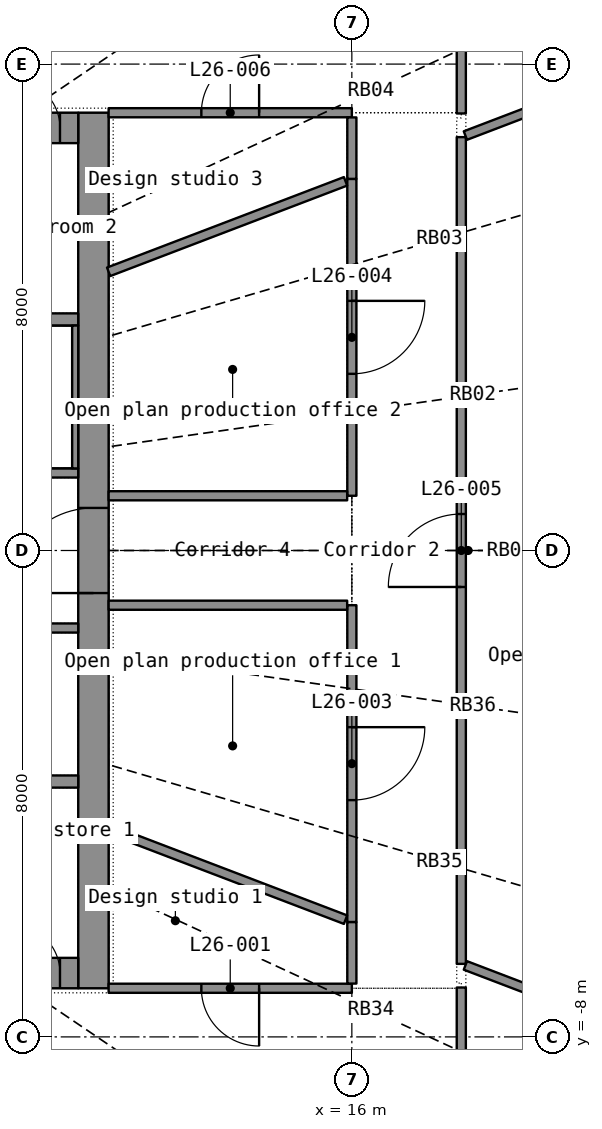
"""IFC4 building model, lengths in metres.
Left out: names, types, materials, properties, quantities, classifications, styles, units other than length and angle.
Written with IfcOpenShell. Run it as: python <this file> out.ifc"""

import sys

from ifc_helpers import new_model, si_unit, direction, frame, frame_2d, origin, place, context, subcontext, project, spatial, rectangle, extrude, element, fill, save


model = new_model("IFC4")
c1 = context("Model", 3, precision=1e-05, world=origin(), true_north=direction((0.0, 1.0)))
c2 = subcontext(c1, "Body", "Model", "MODEL_VIEW")
j1 = project(units=[si_unit("LENGTHUNIT", "METRE"), si_unit("PLANEANGLEUNIT", "RADIAN")], contexts=[c1])
p1 = place(None, origin())
s1 = spatial("IfcSite", under=j1, at=p1, CompositionType="ELEMENT")
p2 = place(p1, origin())
s2 = spatial("IfcBuilding", under=s1, at=p2, CompositionType="ELEMENT")
p3 = place(p2, frame((0.0, 0.0, 111.9)))
s3 = spatial("IfcBuildingStorey", under=s2, at=p3, CompositionType="ELEMENT", Elevation=111.9)
p4 = place(p3, frame((11.75, -7.2, 0.0), z_axis=(0.0, 0.0, 1.0), x_axis=(0.0, 1.0, 0.0)))
e1 = element("IfcWall", 1, at=p4, inside=s3, PredefinedType="SHEAR", context=c2, shape_type="SweptSolid", body=[
    extrude(rectangle(XDim=14.4, YDim=0.5, at=frame_2d((7.2, 0.0))), origin(), (0.0, 0.0, 1.0), 3.3),
])
p5 = place(p4, frame((6.5, 0.0, 0.0)))
e2 = element("IfcOpeningElement", 2, at=p5, cuts=e1, PredefinedType="OPENING", context=c2, shape_type="SweptSolid", body=[
    extrude(rectangle(XDim=1.4, YDim=2.2, at=frame_2d((0.7, 1.1))), frame((0.0, 0.26, 0.0), z_axis=(0.0, -1.0, 0.0), x_axis=(1.0, 0.0, 0.0)), (0.0, 0.0, 1.0), 0.52),
])
p6 = place(p3, frame((-11.5, -6.95, 0.0), z_axis=(0.0, 0.0, 1.0), x_axis=(1.0, 0.0, 0.0)))
e3 = element("IfcWall", 3, at=p6, inside=s3, PredefinedType="SHEAR", context=c2, shape_type="SweptSolid", body=[
    extrude(rectangle(XDim=23.0, YDim=0.5, at=frame_2d((11.5, 0.0))), origin(), (0.0, 0.0, 1.0), 3.3),
])
p7 = place(p6, frame((1.95, 0.0, 0.0)))
e4 = element("IfcOpeningElement", 4, at=p7, cuts=e3, PredefinedType="OPENING", context=c2, shape_type="SweptSolid", body=[
    extrude(rectangle(XDim=1.1, YDim=2.2, at=frame_2d((0.55, 1.1))), frame((0.0, 0.26, 0.0), z_axis=(0.0, -1.0, 0.0), x_axis=(1.0, 0.0, 0.0)), (0.0, 0.0, 1.0), 0.52),
])
p8 = place(p6, frame((3.95, 0.0, 0.0)))
e5 = element("IfcOpeningElement", 5, at=p8, cuts=e3, PredefinedType="OPENING", context=c2, shape_type="SweptSolid", body=[
    extrude(rectangle(XDim=1.1, YDim=2.2, at=frame_2d((0.55, 1.1))), frame((0.0, 0.26, 0.0), z_axis=(0.0, -1.0, 0.0), x_axis=(1.0, 0.0, 0.0)), (0.0, 0.0, 1.0), 0.52),
])
p9 = place(p6, frame((5.95, 0.0, 0.0)))
e6 = element("IfcOpeningElement", 6, at=p9, cuts=e3, PredefinedType="OPENING", context=c2, shape_type="SweptSolid", body=[
    extrude(rectangle(XDim=1.1, YDim=2.2, at=frame_2d((0.55, 1.1))), frame((0.0, 0.26, 0.0), z_axis=(0.0, -1.0, 0.0), x_axis=(1.0, 0.0, 0.0)), (0.0, 0.0, 1.0), 0.52),
])
p10 = place(p6, frame((7.95, 0.0, 0.0)))
e7 = element("IfcOpeningElement", 7, at=p10, cuts=e3, PredefinedType="OPENING", context=c2, shape_type="SweptSolid", body=[
    extrude(rectangle(XDim=1.1, YDim=2.2, at=frame_2d((0.55, 1.1))), frame((0.0, 0.26, 0.0), z_axis=(0.0, -1.0, 0.0), x_axis=(1.0, 0.0, 0.0)), (0.0, 0.0, 1.0), 0.52),
])
p11 = place(p6, frame((9.95, 0.0, 0.0)))
e8 = element("IfcOpeningElement", 8, at=p11, cuts=e3, PredefinedType="OPENING", context=c2, shape_type="SweptSolid", body=[
    extrude(rectangle(XDim=1.1, YDim=2.2, at=frame_2d((0.55, 1.1))), frame((0.0, 0.26, 0.0), z_axis=(0.0, -1.0, 0.0), x_axis=(1.0, 0.0, 0.0)), (0.0, 0.0, 1.0), 0.52),
])
p12 = place(p6, frame((11.95, 0.0, 0.0)))
e9 = element("IfcOpeningElement", 9, at=p12, cuts=e3, PredefinedType="OPENING", context=c2, shape_type="SweptSolid", body=[
    extrude(rectangle(XDim=1.1, YDim=2.2, at=frame_2d((0.55, 1.1))), frame((0.0, 0.26, 0.0), z_axis=(0.0, -1.0, 0.0), x_axis=(1.0, 0.0, 0.0)), (0.0, 0.0, 1.0), 0.52),
])
p13 = place(p6, frame((13.95, 0.0, 0.0)))
e10 = element("IfcOpeningElement", 10, at=p13, cuts=e3, PredefinedType="OPENING", context=c2, shape_type="SweptSolid", body=[
    extrude(rectangle(XDim=1.1, YDim=2.2, at=frame_2d((0.55, 1.1))), frame((0.0, 0.26, 0.0), z_axis=(0.0, -1.0, 0.0), x_axis=(1.0, 0.0, 0.0)), (0.0, 0.0, 1.0), 0.52),
])
p14 = place(p6, frame((15.95, 0.0, 0.0)))
e11 = element("IfcOpeningElement", 11, at=p14, cuts=e3, PredefinedType="OPENING", context=c2, shape_type="SweptSolid", body=[
    extrude(rectangle(XDim=1.1, YDim=2.2, at=frame_2d((0.55, 1.1))), frame((0.0, 0.26, 0.0), z_axis=(0.0, -1.0, 0.0), x_axis=(1.0, 0.0, 0.0)), (0.0, 0.0, 1.0), 0.52),
])
p15 = place(p6, frame((19.95, 0.0, 0.0)))
e12 = element("IfcOpeningElement", 12, at=p15, cuts=e3, PredefinedType="OPENING", context=c2, shape_type="SweptSolid", body=[
    extrude(rectangle(XDim=1.1, YDim=2.2, at=frame_2d((0.55, 1.1))), frame((0.0, 0.26, 0.0), z_axis=(0.0, -1.0, 0.0), x_axis=(1.0, 0.0, 0.0)), (0.0, 0.0, 1.0), 0.52),
])
p16 = place(p6, frame((0.3, 0.0, 0.0)))
e13 = element("IfcOpeningElement", 13, at=p16, cuts=e3, PredefinedType="OPENING", context=c2, shape_type="SweptSolid", body=[
    extrude(rectangle(XDim=0.8, YDim=2.05, at=frame_2d((0.4, 1.025))), frame((0.0, 0.26, 0.0), z_axis=(0.0, -1.0, 0.0), x_axis=(1.0, 0.0, 0.0)), (0.0, 0.0, 1.0), 0.52),
])
p17 = place(p6, frame((21.9, 0.0, 0.0)))
e14 = element("IfcOpeningElement", 14, at=p17, cuts=e3, PredefinedType="OPENING", context=c2, shape_type="SweptSolid", body=[
    extrude(rectangle(XDim=0.8, YDim=2.05, at=frame_2d((0.4, 1.025))), frame((0.0, 0.26, 0.0), z_axis=(0.0, -1.0, 0.0), x_axis=(1.0, 0.0, 0.0)), (0.0, 0.0, 1.0), 0.52),
])
p18 = place(p3, frame((-11.5, 6.95, 0.0), z_axis=(0.0, 0.0, 1.0), x_axis=(1.0, 0.0, 0.0)))
e15 = element("IfcWall", 15, at=p18, inside=s3, PredefinedType="SHEAR", context=c2, shape_type="SweptSolid", body=[
    extrude(rectangle(XDim=23.0, YDim=0.5, at=frame_2d((11.5, 0.0))), origin(), (0.0, 0.0, 1.0), 3.3),
])
p19 = place(p18, frame((1.95, 0.0, 0.0)))
e16 = element("IfcOpeningElement", 16, at=p19, cuts=e15, PredefinedType="OPENING", context=c2, shape_type="SweptSolid", body=[
    extrude(rectangle(XDim=1.1, YDim=2.2, at=frame_2d((0.55, 1.1))), frame((0.0, 0.26, 0.0), z_axis=(0.0, -1.0, 0.0), x_axis=(1.0, 0.0, 0.0)), (0.0, 0.0, 1.0), 0.52),
])
p20 = place(p18, frame((8.05, 0.0, 0.0)))
e17 = element("IfcOpeningElement", 17, at=p20, cuts=e15, PredefinedType="OPENING", context=c2, shape_type="SweptSolid", body=[
    extrude(rectangle(XDim=0.9, YDim=2.1, at=frame_2d((0.45, 1.05))), frame((0.0, 0.26, 0.0), z_axis=(0.0, -1.0, 0.0), x_axis=(1.0, 0.0, 0.0)), (0.0, 0.0, 1.0), 0.52),
])
p21 = place(p18, frame((13.05, 0.0, 0.0)))
e18 = element("IfcOpeningElement", 18, at=p21, cuts=e15, PredefinedType="OPENING", context=c2, shape_type="SweptSolid", body=[
    extrude(rectangle(XDim=0.9, YDim=2.1, at=frame_2d((0.45, 1.05))), frame((0.0, 0.26, 0.0), z_axis=(0.0, -1.0, 0.0), x_axis=(1.0, 0.0, 0.0)), (0.0, 0.0, 1.0), 0.52),
])
p22 = place(p18, frame((18.05, 0.0, 0.0)))
e19 = element("IfcOpeningElement", 19, at=p22, cuts=e15, PredefinedType="OPENING", context=c2, shape_type="SweptSolid", body=[
    extrude(rectangle(XDim=0.9, YDim=2.1, at=frame_2d((0.45, 1.05))), frame((0.0, 0.26, 0.0), z_axis=(0.0, -1.0, 0.0), x_axis=(1.0, 0.0, 0.0)), (0.0, 0.0, 1.0), 0.52),
])
p23 = place(p18, frame((0.3, 0.0, 0.0)))
e20 = element("IfcOpeningElement", 20, at=p23, cuts=e15, PredefinedType="OPENING", context=c2, shape_type="SweptSolid", body=[
    extrude(rectangle(XDim=0.8, YDim=2.05, at=frame_2d((0.4, 1.025))), frame((0.0, 0.26, 0.0), z_axis=(0.0, -1.0, 0.0), x_axis=(1.0, 0.0, 0.0)), (0.0, 0.0, 1.0), 0.52),
])
p24 = place(p18, frame((21.9, 0.0, 0.0)))
e21 = element("IfcOpeningElement", 21, at=p24, cuts=e15, PredefinedType="OPENING", context=c2, shape_type="SweptSolid", body=[
    extrude(rectangle(XDim=0.8, YDim=2.05, at=frame_2d((0.4, 1.025))), frame((0.0, 0.26, 0.0), z_axis=(0.0, -1.0, 0.0), x_axis=(1.0, 0.0, 0.0)), (0.0, 0.0, 1.0), 0.52),
])
for number, where, z_axis, x_axis in (
    (22, (-11.5, -3.8, 0.0), (0.0, 0.0, 1.0), (1.0, 0.0, 0.0)),
    (23, (-11.5, 3.8, 0.0), (0.0, 0.0, 1.0), (1.0, 0.0, 0.0)),
):
    element("IfcWall", number, at=place(p3, frame(where, z_axis=z_axis, x_axis=x_axis)), inside=s3, PredefinedType="SHEAR", context=c2, shape_type="SweptSolid", body=[
        extrude(rectangle(XDim=23.0, YDim=0.2, at=frame_2d((11.5, 0.0))), origin(), (0.0, 0.0, 1.0), 3.3),
    ])
p25 = place(p3, frame((3.0, -1.275, 0.0), z_axis=(0.0, 0.0, 1.0), x_axis=(1.0, 0.0, 0.0)))
e24 = element("IfcWall", 24, at=p25, inside=s3, PredefinedType="PARTITIONING", context=c2, shape_type="SweptSolid", body=[
    extrude(rectangle(XDim=8.5, YDim=0.15, at=frame_2d((4.25, 0.0))), origin(), (0.0, 0.0, 1.0), 3.3),
])
p26 = place(p25, frame((0.969, 0.0, 0.0)))
e25 = element("IfcOpeningElement", 25, at=p26, cuts=e24, PredefinedType="OPENING", context=c2, shape_type="SweptSolid", body=[
    extrude(rectangle(XDim=0.85, YDim=2.1, at=frame_2d((0.425, 1.05))), frame((0.0, 0.085, 0.0), z_axis=(0.0, -1.0, 0.0), x_axis=(1.0, 0.0, 0.0)), (0.0, 0.0, 1.0), 0.17),
])
p27 = place(p25, frame((3.661, 0.0, 0.0)))
e26 = element("IfcOpeningElement", 26, at=p27, cuts=e24, PredefinedType="OPENING", context=c2, shape_type="SweptSolid", body=[
    extrude(rectangle(XDim=0.85, YDim=2.1, at=frame_2d((0.425, 1.05))), frame((0.0, 0.085, 0.0), z_axis=(0.0, -1.0, 0.0), x_axis=(1.0, 0.0, 0.0)), (0.0, 0.0, 1.0), 0.17),
])
p28 = place(p25, frame((6.492, 0.0, 0.0)))
e27 = element("IfcOpeningElement", 27, at=p28, cuts=e24, PredefinedType="OPENING", context=c2, shape_type="SweptSolid", body=[
    extrude(rectangle(XDim=0.9, YDim=2.1, at=frame_2d((0.45, 1.05))), frame((0.0, 0.085, 0.0), z_axis=(0.0, -1.0, 0.0), x_axis=(1.0, 0.0, 0.0)), (0.0, 0.0, 1.0), 0.17),
])
p29 = place(p3, frame((3.0, 1.275, 0.0), z_axis=(0.0, 0.0, 1.0), x_axis=(1.0, 0.0, 0.0)))
e28 = element("IfcWall", 28, at=p29, inside=s3, PredefinedType="SHEAR", context=c2, shape_type="SweptSolid", body=[
    extrude(rectangle(XDim=8.5, YDim=0.15, at=frame_2d((4.25, 0.0))), origin(), (0.0, 0.0, 1.0), 3.3),
])
p30 = place(p29, frame((2.05, 0.0, 0.0)))
e29 = element("IfcOpeningElement", 29, at=p30, cuts=e28, PredefinedType="OPENING", context=c2, shape_type="SweptSolid", body=[
    extrude(rectangle(XDim=1.1, YDim=2.15, at=frame_2d((0.55, 1.075))), frame((0.0, 0.085, 0.0), z_axis=(0.0, -1.0, 0.0), x_axis=(1.0, 0.0, 0.0)), (0.0, 0.0, 1.0), 0.17),
])
p31 = place(p29, frame((0.45, 0.0, 0.0)))
e30 = element("IfcOpeningElement", 30, at=p31, cuts=e28, PredefinedType="OPENING", context=c2, shape_type="SweptSolid", body=[
    extrude(rectangle(XDim=0.9, YDim=2.1, at=frame_2d((0.45, 1.05))), frame((0.0, 0.085, 0.0), z_axis=(0.0, -1.0, 0.0), x_axis=(1.0, 0.0, 0.0)), (0.0, 0.0, 1.0), 0.17),
])
p32 = place(p3, frame((11.45, 1.35, 0.0), z_axis=(0.0, 0.0, 1.0), x_axis=(0.0, 1.0, 0.0)))
e31 = element("IfcWall", 31, at=p32, inside=s3, PredefinedType="SHEAR", context=c2, shape_type="SweptSolid", body=[
    extrude(rectangle(XDim=2.35, YDim=0.1, at=frame_2d((1.175, 0.0))), origin(), (0.0, 0.0, 1.0), 3.3),
])
p33 = place(p3, frame((17.8, -6.799, 0.0), z_axis=(0.0, 0.0, 1.0), x_axis=(0.0, 1.0, 0.0)))
e32 = element("IfcWall", 32, at=p33, inside=s3, PredefinedType="PARTITIONING", context=c2, shape_type="SweptSolid", body=[
    extrude(rectangle(XDim=13.598, YDim=0.15, at=frame_2d((6.799, 0.0))), origin(), (0.0, 0.0, 1.0), 2.4),
])
p34 = place(p33, frame((6.199, 0.0, 0.0)))
e33 = element("IfcOpeningElement", 33, at=p34, cuts=e32, PredefinedType="OPENING", context=c2, shape_type="SweptSolid", body=[
    extrude(rectangle(XDim=1.2, YDim=2.2, at=frame_2d((0.6, 1.1))), frame((0.0, 0.085, 0.0), z_axis=(0.0, -1.0, 0.0), x_axis=(1.0, 0.0, 0.0)), (0.0, 0.0, 1.0), 0.17),
])
p35 = place(p3, frame((23.094, -8.821, 0.0), z_axis=(0.0, 0.0, 1.0), x_axis=(-0.934174226, 0.356817201, 0.0)))
e34 = element("IfcWall", 34, at=p35, inside=s3, PredefinedType="PARTITIONING", context=c2, shape_type="SweptSolid", body=[
    extrude(rectangle(XDim=5.595, YDim=0.15, at=frame_2d((2.797, 0.0))), origin(), (0.0, 0.0, 1.0), 2.4),
])
p36 = place(p3, frame((23.092, 8.82, 0.0), z_axis=(0.0, 0.0, 1.0), x_axis=(-0.934164423, -0.356842865, 0.0)))
e35 = element("IfcWall", 35, at=p36, inside=s3, PredefinedType="PARTITIONING", context=c2, shape_type="SweptSolid", body=[
    extrude(rectangle(XDim=5.593, YDim=0.15, at=frame_2d((2.796, 0.0))), origin(), (0.0, 0.0, 1.0), 2.4),
])
p37 = place(p3, frame((16.0, -0.9, 0.0), z_axis=(0.0, 0.0, 1.0), x_axis=(0.0, -1.0, 0.0)))
e36 = element("IfcWall", 36, at=p37, inside=s3, PredefinedType="PARTITIONING", context=c2, shape_type="SweptSolid", body=[
    extrude(rectangle(XDim=5.211, YDim=0.15, at=frame_2d((2.606, 0.0))), origin(), (0.0, 0.0, 1.0), 2.4),
])
p38 = place(p37, frame((2.006, 0.0, 0.0)))
e37 = element("IfcOpeningElement", 37, at=p38, cuts=e36, PredefinedType="OPENING", context=c2, shape_type="SweptSolid", body=[
    extrude(rectangle(XDim=1.2, YDim=2.2, at=frame_2d((0.6, 1.1))), frame((0.0, 0.085, 0.0), z_axis=(0.0, -1.0, 0.0), x_axis=(1.0, 0.0, 0.0)), (0.0, 0.0, 1.0), 0.17),
])
p39 = place(p3, frame((16.0, 6.111, 0.0), z_axis=(0.0, 0.0, 1.0), x_axis=(0.0, -1.0, 0.0)))
e38 = element("IfcWall", 38, at=p39, inside=s3, PredefinedType="PARTITIONING", context=c2, shape_type="SweptSolid", body=[
    extrude(rectangle(XDim=5.211, YDim=0.15, at=frame_2d((2.606, 0.0))), origin(), (0.0, 0.0, 1.0), 2.4),
])
p40 = place(p39, frame((2.006, 0.0, 0.0)))
e39 = element("IfcOpeningElement", 39, at=p40, cuts=e38, PredefinedType="OPENING", context=c2, shape_type="SweptSolid", body=[
    extrude(rectangle(XDim=1.2, YDim=2.2, at=frame_2d((0.6, 1.1))), frame((0.0, 0.085, 0.0), z_axis=(0.0, -1.0, 0.0), x_axis=(1.0, 0.0, 0.0)), (0.0, 0.0, 1.0), 0.17),
])
for number, where, z_axis, x_axis in (
    (40, (15.896, -6.072, 0.0), (0.0, 0.0, 1.0), (-0.934, 0.357, 0.0)),
    (41, (15.896, 6.072, 0.0), (0.0, 0.0, 1.0), (-0.934, -0.357, 0.0)),
):
    element("IfcWall", number, at=place(p3, frame(where, z_axis=z_axis, x_axis=x_axis)), inside=s3, PredefinedType="PARTITIONING", context=c2, shape_type="SweptSolid", body=[
        extrude(rectangle(XDim=4.171, YDim=0.15, at=frame_2d((2.085, 0.0))), origin(), (0.0, 0.0, 1.0), 2.4),
    ])
p41 = place(p3, frame((12.0, -0.9, 0.0), z_axis=(0.0, 0.0, 1.0), x_axis=(1.0, 0.0, 0.0)))
e42 = element("IfcWall", 42, at=p41, inside=s3, PredefinedType="PARTITIONING", context=c2, shape_type="SweptSolid", body=[
    extrude(rectangle(XDim=3.923, YDim=0.15, at=frame_2d((1.961, 0.0))), origin(), (0.0, 0.0, 1.0), 2.4),
])
p42 = place(p3, frame((12.0, 7.2, 0.0), z_axis=(0.0, 0.0, 1.0), x_axis=(1.0, 0.0, 0.0)))
e43 = element("IfcWall", 43, at=p42, inside=s3, PredefinedType="PARTITIONING", context=c2, shape_type="SweptSolid", body=[
    extrude(rectangle(XDim=4.0, YDim=0.15, at=frame_2d((2.0, 0.0))), origin(), (0.0, 0.0, 1.0), 2.4),
])
p43 = place(p42, frame((1.525, 0.0, 0.0)))
e44 = element("IfcOpeningElement", 44, at=p43, cuts=e43, PredefinedType="OPENING", context=c2, shape_type="SweptSolid", body=[
    extrude(rectangle(XDim=0.95, YDim=2.15, at=frame_2d((0.475, 1.075))), frame((0.0, 0.085, 0.0), z_axis=(0.0, -1.0, 0.0), x_axis=(1.0, 0.0, 0.0)), (0.0, 0.0, 1.0), 0.17),
])
p44 = place(p3, frame((16.0, -7.2, 0.0), z_axis=(0.0, 0.0, 1.0), x_axis=(-1.0, 0.0, 0.0)))
e45 = element("IfcWall", 45, at=p44, inside=s3, PredefinedType="PARTITIONING", context=c2, shape_type="SweptSolid", body=[
    extrude(rectangle(XDim=4.0, YDim=0.15, at=frame_2d((2.0, 0.0))), origin(), (0.0, 0.0, 1.0), 2.4),
])
p45 = place(p44, frame((1.525, 0.0, 0.0)))
e46 = element("IfcOpeningElement", 46, at=p45, cuts=e45, PredefinedType="OPENING", context=c2, shape_type="SweptSolid", body=[
    extrude(rectangle(XDim=0.95, YDim=2.15, at=frame_2d((0.475, 1.075))), frame((0.0, 0.085, 0.0), z_axis=(0.0, -1.0, 0.0), x_axis=(1.0, 0.0, 0.0)), (0.0, 0.0, 1.0), 0.17),
])
p46 = place(p3, frame((15.923, 0.9, 0.0), z_axis=(0.0, 0.0, 1.0), x_axis=(-1.0, 0.0, 0.0)))
e47 = element("IfcWall", 47, at=p46, inside=s3, PredefinedType="PARTITIONING", context=c2, shape_type="SweptSolid", body=[
    extrude(rectangle(XDim=3.923, YDim=0.15, at=frame_2d((1.961, 0.0))), origin(), (0.0, 0.0, 1.0), 2.4),
])
p47 = place(p3, frame((17.8, 7.188, 0.0), z_axis=(0.0, 0.0, 1.0), x_axis=(0.0, 1.0, 0.0)))
e48 = element("IfcWall", 48, at=p47, inside=s3, PredefinedType="PARTITIONING", context=c2, shape_type="SweptSolid", body=[
    extrude(rectangle(XDim=3.535, YDim=0.15, at=frame_2d((1.768, 0.0))), origin(), (0.0, 0.0, 1.0), 2.4),
])
p48 = place(p3, frame((17.8, -9.523, 0.0), z_axis=(0.0, 0.0, 1.0), x_axis=(0.0, 1.0, 0.0)))
e49 = element("IfcWall", 49, at=p48, inside=s3, PredefinedType="PARTITIONING", context=c2, shape_type="SweptSolid", body=[
    extrude(rectangle(XDim=2.335, YDim=0.15, at=frame_2d((1.167, 0.0))), origin(), (0.0, 0.0, 1.0), 2.4),
])
for number, where, z_axis, x_axis in (
    (50, (16.0, -6.112, 0.0), (0.0, 0.0, 1.0), (0.0, -1.0, 0.0)),
    (51, (16.0, 7.123, 0.0), (0.0, 0.0, 1.0), (0.0, -1.0, 0.0)),
):
    element("IfcWall", number, at=place(p3, frame(where, z_axis=z_axis, x_axis=x_axis)), inside=s3, PredefinedType="PARTITIONING", context=c2, shape_type="SweptSolid", body=[
        extrude(rectangle(XDim=1.011, YDim=0.15, at=frame_2d((0.505, 0.0))), origin(), (0.0, 0.0, 1.0), 2.4),
    ])
p49 = place(p17, origin())
e52 = element("IfcDoor", 52, at=p49, inside=s3, OperationType="SINGLE_SWING_LEFT", PredefinedType="DOOR", context=c2, shape_type="SweptSolid", body=[
    extrude(rectangle(XDim=0.8, YDim=2.05, at=frame_2d((0.4, 1.025))), frame((0.0, 0.025, 0.0), z_axis=(0.0, -1.0, 0.0), x_axis=(1.0, 0.0, 0.0)), (0.0, 0.0, 1.0), 0.05),
])
fill(e14, e52)
p50 = place(p24, origin())
e53 = element("IfcDoor", 53, at=p50, inside=s3, OperationType="SINGLE_SWING_LEFT", PredefinedType="DOOR", context=c2, shape_type="SweptSolid", body=[
    extrude(rectangle(XDim=0.8, YDim=2.05, at=frame_2d((0.4, 1.025))), frame((0.0, 0.025, 0.0), z_axis=(0.0, -1.0, 0.0), x_axis=(1.0, 0.0, 0.0)), (0.0, 0.0, 1.0), 0.05),
])
fill(e21, e53)
p51 = place(p5, origin())
e54 = element("IfcDoor", 54, at=p51, inside=s3, OperationType="DOUBLE_DOOR_SINGLE_SWING", PredefinedType="DOOR", context=c2, shape_type="SweptSolid", body=[
    extrude(rectangle(XDim=1.4, YDim=2.2, at=frame_2d((0.7, 1.1))), frame((0.0, 0.025, 0.0), z_axis=(0.0, -1.0, 0.0), x_axis=(1.0, 0.0, 0.0)), (0.0, 0.0, 1.0), 0.05),
])
fill(e2, e54)
p52 = place(p45, origin())
e55 = element("IfcDoor", 55, at=p52, inside=s3, OperationType="SINGLE_SWING_LEFT", PredefinedType="DOOR", context=c2, shape_type="SweptSolid", body=[
    extrude(rectangle(XDim=0.95, YDim=2.15, at=frame_2d((0.475, 1.075))), frame((0.0, 0.025, 0.0), z_axis=(0.0, -1.0, 0.0), x_axis=(1.0, 0.0, 0.0)), (0.0, 0.0, 1.0), 0.05),
])
fill(e46, e55)
p53 = place(p38, origin())
e56 = element("IfcDoor", 56, at=p53, inside=s3, OperationType="DOUBLE_DOOR_SINGLE_SWING", PredefinedType="DOOR", context=c2, shape_type="SweptSolid", body=[
    extrude(rectangle(XDim=1.2, YDim=2.2, at=frame_2d((0.6, 1.1))), frame((0.0, 0.025, 0.0), z_axis=(0.0, -1.0, 0.0), x_axis=(1.0, 0.0, 0.0)), (0.0, 0.0, 1.0), 0.05),
])
fill(e37, e56)
p54 = place(p40, origin())
e57 = element("IfcDoor", 57, at=p54, inside=s3, OperationType="DOUBLE_DOOR_SINGLE_SWING", PredefinedType="DOOR", context=c2, shape_type="SweptSolid", body=[
    extrude(rectangle(XDim=1.2, YDim=2.2, at=frame_2d((0.6, 1.1))), frame((0.0, 0.025, 0.0), z_axis=(0.0, -1.0, 0.0), x_axis=(1.0, 0.0, 0.0)), (0.0, 0.0, 1.0), 0.05),
])
fill(e39, e57)
p55 = place(p34, origin())
e58 = element("IfcDoor", 58, at=p55, inside=s3, OperationType="DOUBLE_DOOR_SINGLE_SWING", PredefinedType="DOOR", context=c2, shape_type="SweptSolid", body=[
    extrude(rectangle(XDim=1.2, YDim=2.2, at=frame_2d((0.6, 1.1))), frame((0.0, 0.025, 0.0), z_axis=(0.0, -1.0, 0.0), x_axis=(1.0, 0.0, 0.0)), (0.0, 0.0, 1.0), 0.05),
])
fill(e33, e58)
p56 = place(p43, origin())
e59 = element("IfcDoor", 59, at=p56, inside=s3, OperationType="SINGLE_SWING_RIGHT", PredefinedType="DOOR", context=c2, shape_type="SweptSolid", body=[
    extrude(rectangle(XDim=0.95, YDim=2.15, at=frame_2d((0.475, 1.075))), frame((0.0, 0.025, 0.0), z_axis=(0.0, -1.0, 0.0), x_axis=(1.0, 0.0, 0.0)), (0.0, 0.0, 1.0), 0.05),
])
fill(e44, e59)
save(model, sys.argv[1])
